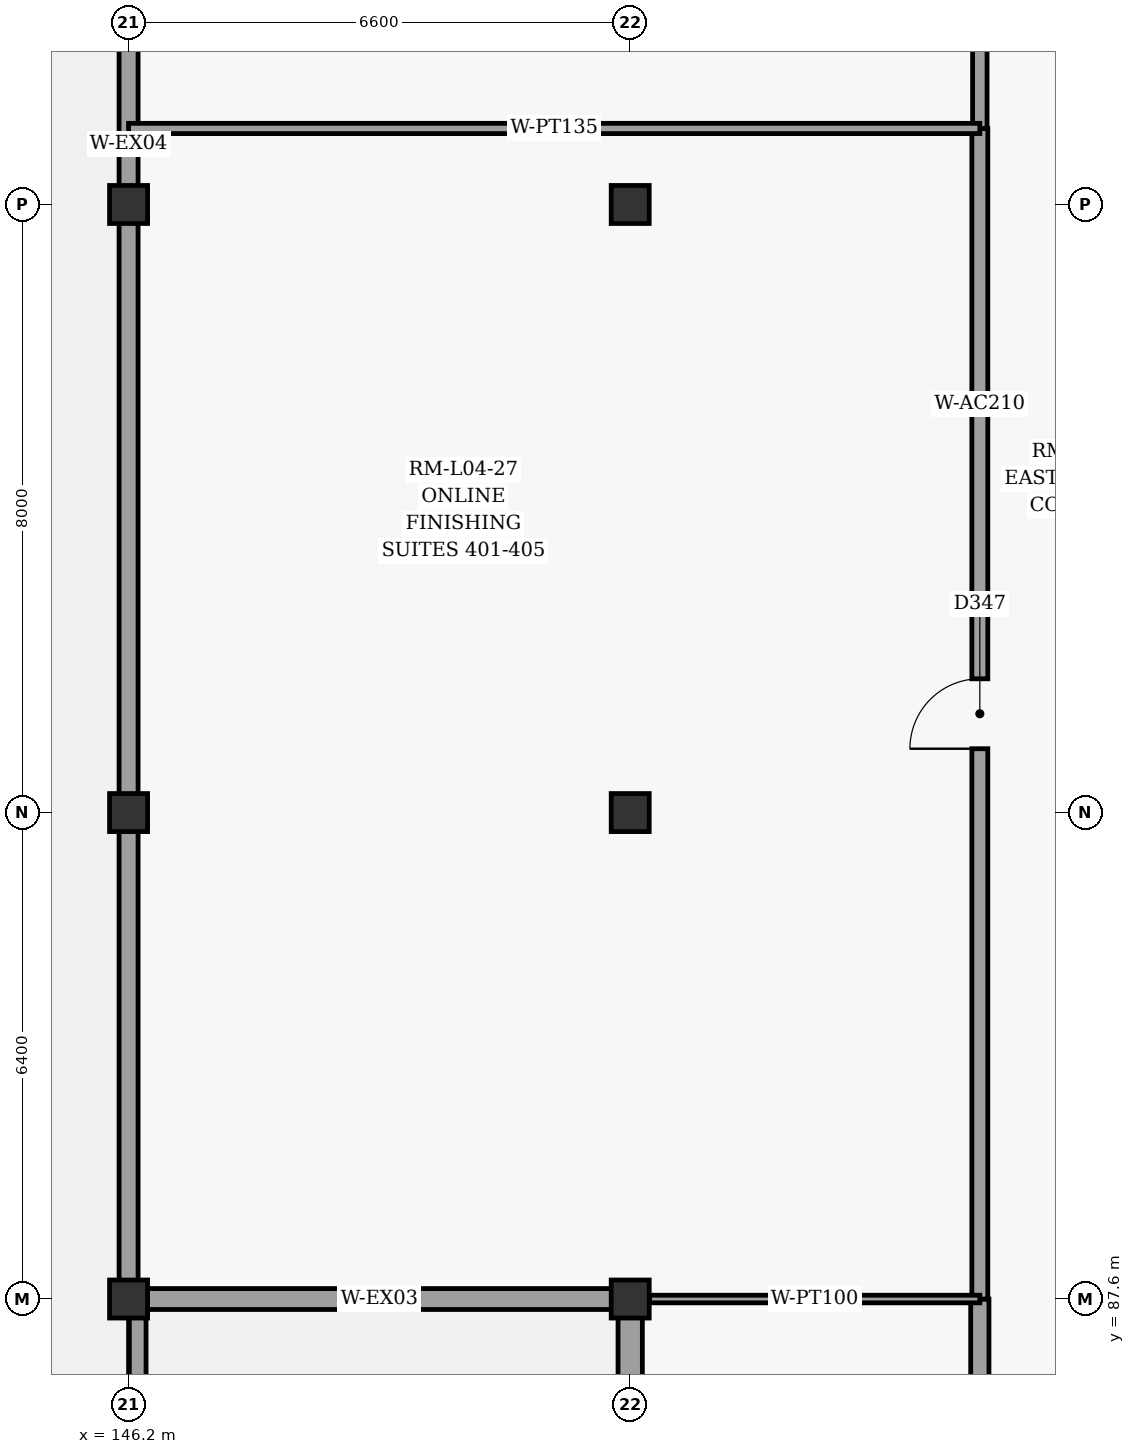
"""IFC4 building model, lengths in metres.
Left out: names, types, materials, properties, quantities, classifications, styles, units other than length and angle.
Written with IfcOpenShell. Run it as: python <this file> out.ifc"""

import sys

from ifc_helpers import new_model, si_unit, direction, frame, frame_2d, origin, origin_2d, place, context, subcontext, project, spatial, rectangle, extrude, element, fill, save


model = new_model("IFC4")
c1 = context("Model", 3, precision=1e-05, world=origin(), true_north=direction((0.0, 1.0)))
c2 = subcontext(c1, "Body", "Model", "MODEL_VIEW")
j1 = project(units=[si_unit("LENGTHUNIT", "METRE"), si_unit("PLANEANGLEUNIT", "RADIAN")], contexts=[c1])
p1 = place(None, origin())
s1 = spatial("IfcSite", under=j1, at=p1, CompositionType="ELEMENT")
p2 = place(p1, origin())
s2 = spatial("IfcBuilding", under=s1, at=p2, CompositionType="ELEMENT")
p3 = place(p2, frame((0.0, 0.0, 20.4)))
s3 = spatial("IfcBuildingStorey", under=s2, at=p3, CompositionType="ELEMENT", Elevation=20.4)
for number, where, z_axis, x_axis in (
    (1, (146.2, 87.6, 0.0), (0.0, 0.0, 1.0), (1.0, 0.0, 0.0)),
    (2, (146.2, 94.0, 0.0), (0.0, 0.0, 1.0), (1.0, 0.0, 0.0)),
    (3, (146.2, 102.0, 0.0), (0.0, 0.0, 1.0), (1.0, 0.0, 0.0)),
    (4, (152.8, 87.6, 0.0), (0.0, 0.0, 1.0), (1.0, 0.0, 0.0)),
    (5, (152.8, 94.0, 0.0), (0.0, 0.0, 1.0), (1.0, 0.0, 0.0)),
    (6, (152.8, 102.0, 0.0), (0.0, 0.0, 1.0), (1.0, 0.0, 0.0)),
):
    element("IfcColumn", number, at=place(p3, frame(where, z_axis=z_axis, x_axis=x_axis)), inside=s3, PredefinedType="COLUMN", context=c2, shape_type="SweptSolid", body=[
        extrude(rectangle(XDim=0.5, YDim=0.5, at=origin_2d()), origin(), (0.0, 0.0, 1.0), 4.5),
    ])
p4 = place(p3, frame((152.8, 87.6, 0.0), z_axis=(0.0, 0.0, 1.0), x_axis=(-1.0, 0.0, 0.0)))
e7 = element("IfcWall", 7, at=p4, inside=s3, PredefinedType="SOLIDWALL", context=c2, shape_type="SweptSolid", body=[
    extrude(rectangle(XDim=6.6, YDim=0.275, at=frame_2d((3.3, 0.0))), origin(), (0.0, 0.0, 1.0), 3.65),
])
p5 = place(p3, frame((146.2, 87.74, 0.0), z_axis=(0.0, 0.0, 1.0), x_axis=(0.0, 1.0, 0.0)))
e8 = element("IfcWall", 8, at=p5, inside=s3, PredefinedType="SOLIDWALL", context=c2, shape_type="SweptSolid", body=[
    extrude(rectangle(XDim=30.12, YDim=0.25, at=frame_2d((15.06, 0.0))), origin(), (0.0, 0.0, 1.0), 3.45),
])
p6 = place(p3, frame((152.8, 71.74, 0.0), z_axis=(0.0, 0.0, 1.0), x_axis=(0.0, 1.0, 0.0)))
e9 = element("IfcWall", 9, at=p6, inside=s3, PredefinedType="SOLIDWALL", context=c2, shape_type="SweptSolid", body=[
    extrude(rectangle(XDim=15.72, YDim=0.32, at=frame_2d((7.86, 0.0))), origin(), (0.0, 0.0, 1.0), 3.45),
])
p7 = place(p6, frame((9.66, 0.0, 0.0)))
e10 = element("IfcOpeningElement", 10, at=p7, cuts=e9, PredefinedType="OPENING", context=c2, shape_type="SweptSolid", body=[
    extrude(rectangle(XDim=1.2, YDim=2.2, at=frame_2d((0.6, 1.1))), frame((0.0, 0.17, 0.0), z_axis=(0.0, -1.0, 0.0), x_axis=(1.0, 0.0, 0.0)), (0.0, 0.0, 1.0), 0.34),
])
p8 = place(p3, frame((157.4, 78.4, 0.0), z_axis=(0.0, 0.0, 1.0), x_axis=(0.0, 1.0, 0.0)))
e11 = element("IfcWall", 11, at=p8, inside=s3, PredefinedType="PARTITIONING", context=c2, shape_type="SweptSolid", body=[
    extrude(rectangle(XDim=9.2, YDim=0.24, at=frame_2d((4.6, 0.0))), origin(), (0.0, 0.0, 1.0), 4.3),
])
p9 = place(p8, frame((3.8, 0.0, 0.0)))
e12 = element("IfcOpeningElement", 12, at=p9, cuts=e11, PredefinedType="OPENING", context=c2, shape_type="SweptSolid", body=[
    extrude(rectangle(XDim=1.6, YDim=2.3, at=frame_2d((0.8, 1.15))), frame((0.0, 0.13, 0.0), z_axis=(0.0, -1.0, 0.0), x_axis=(1.0, 0.0, 0.0)), (0.0, 0.0, 1.0), 0.26),
])
p10 = place(p3, frame((157.4, 87.6, 0.0), z_axis=(0.0, 0.0, 1.0), x_axis=(0.0, 1.0, 0.0)))
e13 = element("IfcWall", 13, at=p10, inside=s3, PredefinedType="PARTITIONING", context=c2, shape_type="SweptSolid", body=[
    extrude(rectangle(XDim=15.4, YDim=0.21, at=frame_2d((7.7, 0.0))), origin(), (0.0, 0.0, 1.0), 4.3),
])
p11 = place(p10, frame((7.24, 0.0, 0.0)))
e14 = element("IfcOpeningElement", 14, at=p11, cuts=e13, PredefinedType="OPENING", context=c2, shape_type="SweptSolid", body=[
    extrude(rectangle(XDim=0.92, YDim=2.1, at=frame_2d((0.46, 1.05))), frame((0.0, 0.115, 0.0), z_axis=(0.0, -1.0, 0.0), x_axis=(1.0, 0.0, 0.0)), (0.0, 0.0, 1.0), 0.23),
])
p12 = place(p3, frame((157.4, 103.0, 0.0), z_axis=(0.0, 0.0, 1.0), x_axis=(0.0, 1.0, 0.0)))
e15 = element("IfcWall", 15, at=p12, inside=s3, PredefinedType="PARTITIONING", context=c2, shape_type="SweptSolid", body=[
    extrude(rectangle(XDim=15.0, YDim=0.19, at=frame_2d((7.5, 0.0))), origin(), (0.0, 0.0, 1.0), 4.3),
])
p13 = place(p12, frame((7.025, 0.0, 0.0)))
e16 = element("IfcOpeningElement", 16, at=p13, cuts=e15, PredefinedType="OPENING", context=c2, shape_type="SweptSolid", body=[
    extrude(rectangle(XDim=0.95, YDim=2.1, at=frame_2d((0.475, 1.05))), frame((0.0, 0.105, 0.0), z_axis=(0.0, -1.0, 0.0), x_axis=(1.0, 0.0, 0.0)), (0.0, 0.0, 1.0), 0.21),
])
p14 = place(p3, frame((153.052, 87.6, 0.0), z_axis=(0.0, 0.0, 1.0), x_axis=(1.0, 0.0, 0.0)))
e17 = element("IfcWall", 17, at=p14, inside=s3, PredefinedType="PARTITIONING", context=c2, shape_type="SweptSolid", body=[
    extrude(rectangle(XDim=4.348, YDim=0.1, at=frame_2d((2.174, 0.0))), origin(), (0.0, 0.0, 1.0), 3.65),
])
p15 = place(p3, frame((146.2, 103.0, 0.0), z_axis=(0.0, 0.0, 1.0), x_axis=(1.0, 0.0, 0.0)))
e18 = element("IfcWall", 18, at=p15, inside=s3, PredefinedType="PARTITIONING", context=c2, shape_type="SweptSolid", body=[
    extrude(rectangle(XDim=11.2, YDim=0.135, at=frame_2d((5.6, 0.0))), origin(), (0.0, 0.0, 1.0), 4.3),
])
p16 = place(p3, frame((146.32, 71.62, 0.0), z_axis=(0.0, 0.0, 1.0), x_axis=(0.0, 1.0, 0.0)))
e19 = element("IfcWall", 19, at=p16, inside=s3, PredefinedType="PARAPET", context=c2, shape_type="SweptSolid", body=[
    extrude(rectangle(XDim=15.93, YDim=0.22, at=frame_2d((7.965, 0.0))), origin(), (0.0, 0.0, 1.0), 0.95),
])
p17 = place(p11, origin())
e20 = element("IfcDoor", 20, at=p17, inside=s3, OperationType="SINGLE_SWING_LEFT", PredefinedType="DOOR", context=c2, shape_type="SweptSolid", body=[
    extrude(rectangle(XDim=0.92, YDim=2.1, at=frame_2d((0.46, 1.05))), frame((0.0, 0.025, 0.0), z_axis=(0.0, -1.0, 0.0), x_axis=(1.0, 0.0, 0.0)), (0.0, 0.0, 1.0), 0.05),
])
fill(e14, e20)
save(model, sys.argv[1])
